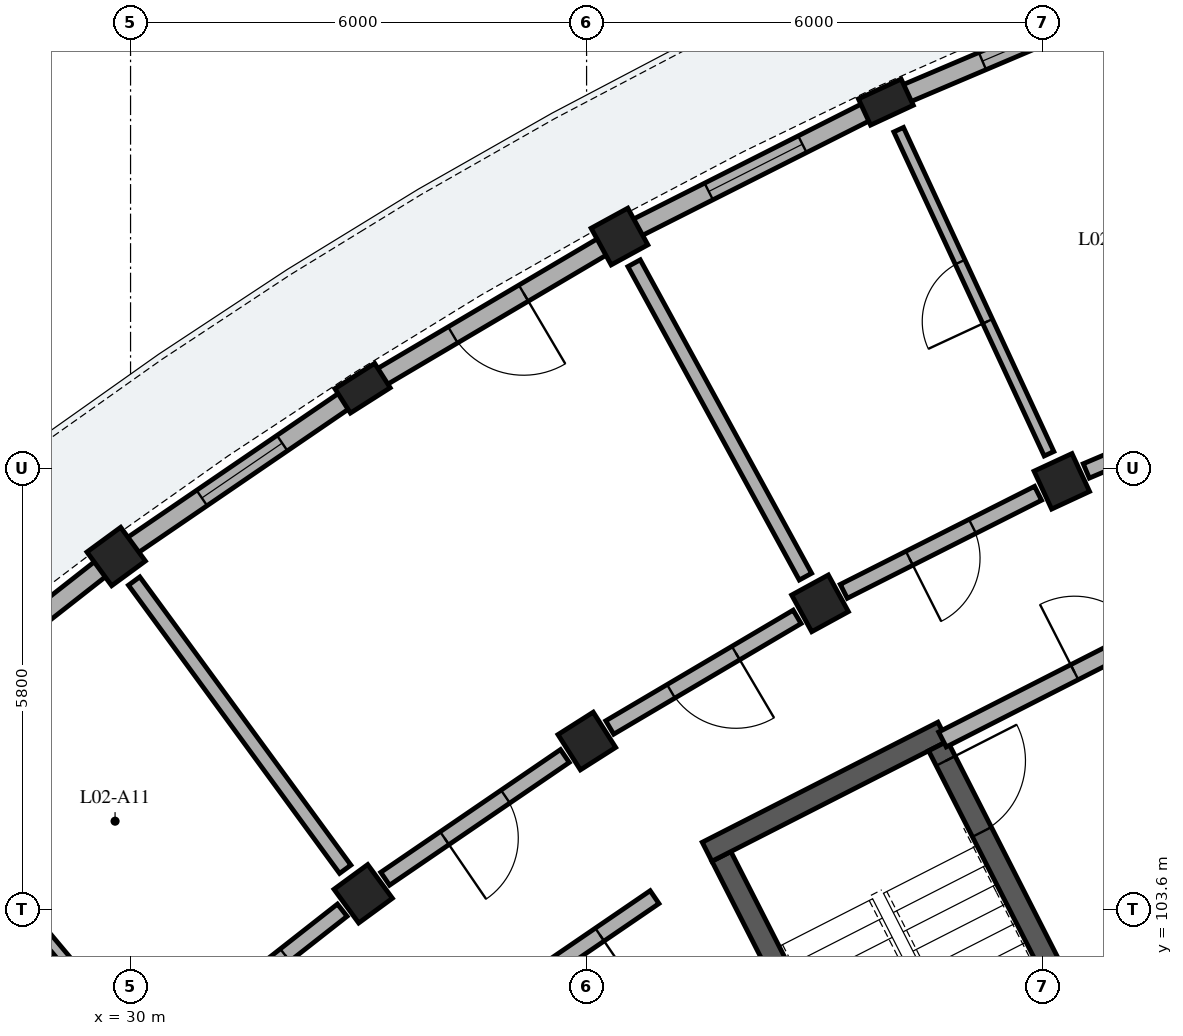
"""IFC4 building model, lengths in metres.
Left out: names, types, materials, properties, quantities, classifications, styles, units other than length and angle.
Written with IfcOpenShell. Run it as: python <this file> out.ifc"""

import sys

from ifc_helpers import new_model, si_unit, direction, frame, frame_2d, origin, origin_2d, place, context, subcontext, project, spatial, rectangle, extrude, element, fill, save


model = new_model("IFC4")
c1 = context("Model", 3, precision=1e-05, world=origin(), true_north=direction((0.0, 1.0)))
c2 = subcontext(c1, "Body", "Model", "MODEL_VIEW")
j1 = project(units=[si_unit("LENGTHUNIT", "METRE"), si_unit("PLANEANGLEUNIT", "RADIAN")], contexts=[c1])
p1 = place(None, origin())
s1 = spatial("IfcSite", under=j1, at=p1, CompositionType="ELEMENT")
p2 = place(p1, origin())
s2 = spatial("IfcBuilding", under=s1, at=p2, CompositionType="ELEMENT")
p3 = place(p2, frame((0.0, 0.0, 8.84)))
s3 = spatial("IfcBuildingStorey", under=s2, at=p3, CompositionType="ELEMENT", Elevation=8.84)
p4 = place(p3, frame((37.773, 104.296, 0.0), z_axis=(0.0, 0.0, 1.0), x_axis=(0.453992276384, -0.891005618941, 0.0)))
e1 = element("IfcWall", 1, at=p4, inside=s3, PredefinedType="SHEAR", context=c2, shape_type="SweptSolid", body=[
    extrude(rectangle(XDim=6.6, YDim=0.28, at=frame_2d((3.3, 0.0))), origin(), (0.0, 0.0, 1.0), 3.11),
])
p5 = place(p3, frame((37.585, 104.357, 0.0), z_axis=(0.0, 0.0, 1.0), x_axis=(0.891020222667, 0.453963613958, 0.0)))
e2 = element("IfcWall", 2, at=p5, inside=s3, PredefinedType="SHEAR", context=c2, shape_type="SweptSolid", body=[
    extrude(rectangle(XDim=3.48, YDim=0.28, at=frame_2d((1.74, 0.0))), origin(), (0.0, 0.0, 1.0), 3.11),
])
p6 = place(p3, frame((40.625, 105.748, 0.0), z_axis=(0.0, 0.0, 1.0), x_axis=(0.453992276384, -0.891005618941, 0.0)))
e3 = element("IfcWall", 3, at=p6, inside=s3, PredefinedType="SHEAR", context=c2, shape_type="SweptSolid", body=[
    extrude(rectangle(XDim=6.6, YDim=0.28, at=frame_2d((3.3, 0.0))), origin(), (0.0, 0.0, 1.0), 3.11),
])
p7 = place(p6, frame((0.22, 0.0, 0.0)))
e4 = element("IfcOpeningElement", 4, at=p7, cuts=e3, PredefinedType="OPENING", context=c2, shape_type="SweptSolid", body=[
    extrude(rectangle(XDim=1.05, YDim=2.15, at=frame_2d((0.525, 1.075))), frame((0.0, 0.15, 0.0), z_axis=(0.0, -1.0, 0.0), x_axis=(1.0, 0.0, 0.0)), (0.0, 0.0, 1.0), 0.3),
])
p8 = place(p3, frame((42.597, 102.561, 0.0), z_axis=(0.0, 0.0, 1.0), x_axis=(0.891001200497, 0.454000947921, 0.0)))
e5 = element("IfcWall", 5, at=p8, inside=s3, PredefinedType="SHEAR", context=c2, shape_type="SweptSolid", body=[
    extrude(rectangle(XDim=3.26, YDim=0.23, at=frame_2d((1.63, 0.0))), origin(), (0.0, 0.0, 1.0), 3.11),
])
p9 = place(p8, frame((0.9, 0.0, 0.0)))
e6 = element("IfcOpeningElement", 6, at=p9, cuts=e5, PredefinedType="OPENING", context=c2, shape_type="SweptSolid", body=[
    extrude(rectangle(XDim=1.1, YDim=2.15, at=frame_2d((0.55, 1.075))), frame((0.0, 0.125, 0.0), z_axis=(0.0, -1.0, 0.0), x_axis=(1.0, 0.0, 0.0)), (0.0, 0.0, 1.0), 0.25),
])
p10 = place(p3, frame((42.252, 109.23, 0.0), z_axis=(0.0, 0.0, 1.0), x_axis=(-0.420859924104, 0.907125638643, 0.0)))
e7 = element("IfcColumn", 7, at=p10, inside=s3, PredefinedType="COLUMN", context=c2, shape_type="SweptSolid", body=[
    extrude(rectangle(XDim=0.55, YDim=0.55, at=origin_2d()), origin(), (0.0, 0.0, 1.0), 3.105),
])
p11 = place(p3, frame((39.938, 114.219, 0.0), z_axis=(0.0, 0.0, 1.0), x_axis=(-0.420859924104, 0.907125638643, 0.0)))
e8 = element("IfcColumn", 8, at=p11, inside=s3, PredefinedType="PILASTER", context=c2, shape_type="SweptSolid", body=[
    extrude(rectangle(XDim=0.38, YDim=0.62, at=origin_2d()), origin(), (0.0, 0.0, 1.0), 3.105),
])
for number, where, z_axis, x_axis in (
    (9, (39.072, 107.625, 0.0), (0.0, 0.0, 1.0), (-0.48, 0.877, 0.0)),
    (10, (36.433, 112.451, 0.0), (0.0, 0.0, 1.0), (-0.48, 0.877, 0.0)),
    (11, (36.003, 105.813, 0.0), (0.0, 0.0, 1.0), (-0.536, 0.844, 0.0)),
):
    element("IfcColumn", number, at=place(p3, frame(where, z_axis=z_axis, x_axis=x_axis)), inside=s3, PredefinedType="COLUMN", context=c2, shape_type="SweptSolid", body=[
        extrude(rectangle(XDim=0.55, YDim=0.55, at=origin_2d()), origin(), (0.0, 0.0, 1.0), 3.105),
    ])
p12 = place(p3, frame((33.052, 110.455, 0.0), z_axis=(0.0, 0.0, 1.0), x_axis=(-0.536481603385, 0.843912015099, 0.0)))
e12 = element("IfcColumn", 12, at=p12, inside=s3, PredefinedType="PILASTER", context=c2, shape_type="SweptSolid", body=[
    extrude(rectangle(XDim=0.38, YDim=0.62, at=origin_2d()), origin(), (0.0, 0.0, 1.0), 3.105),
])
for number, where, z_axis, x_axis in (
    (13, (33.061, 103.804, 0.0), (0.0, 0.0, 1.0), (-0.591, 0.807, 0.0)),
    (14, (29.811, 108.241, 0.0), (0.0, 0.0, 1.0), (-0.591, 0.807, 0.0)),
):
    element("IfcColumn", number, at=place(p3, frame(where, z_axis=z_axis, x_axis=x_axis)), inside=s3, PredefinedType="COLUMN", context=c2, shape_type="SweptSolid", body=[
        extrude(rectangle(XDim=0.55, YDim=0.55, at=origin_2d()), origin(), (0.0, 0.0, 1.0), 3.105),
    ])
p13 = place(p3, frame((43.326, 115.657, 0.0), z_axis=(0.0, 0.0, 1.0), x_axis=(-0.920502438884, -0.390736816807, 0.0)))
e15 = element("IfcWall", 15, at=p13, inside=s3, PredefinedType="SOLIDWALL", context=c2, shape_type="SweptSolid", body=[
    extrude(rectangle(XDim=3.521, YDim=0.245, at=frame_2d((1.76, 0.0))), origin(), (0.0, 0.0, 1.0), 2.355),
])
p14 = place(p13, frame((1.22, 0.0, 0.55)))
e16 = element("IfcOpeningElement", 16, at=p14, cuts=e15, PredefinedType="OPENING", context=c2, shape_type="SweptSolid", body=[
    extrude(rectangle(XDim=1.08, YDim=1.45, at=frame_2d((0.54, 0.725))), frame((0.0, 0.133, 0.0), z_axis=(0.0, -1.0, 0.0), x_axis=(1.0, 0.0, 0.0)), (0.0, 0.0, 1.0), 0.265),
])
p15 = place(p3, frame((39.795, 114.147, 0.0), z_axis=(0.0, 0.0, 1.0), x_axis=(-0.892756700232, -0.450539092855, 0.0)))
e17 = element("IfcWall", 17, at=p15, inside=s3, PredefinedType="SOLIDWALL", context=c2, shape_type="SweptSolid", body=[
    extrude(rectangle(XDim=3.521, YDim=0.245, at=frame_2d((1.76, 0.0))), origin(), (0.0, 0.0, 1.0), 2.355),
])
p16 = place(p15, frame((1.07, 0.0, 0.55)))
e18 = element("IfcOpeningElement", 18, at=p16, cuts=e17, PredefinedType="OPENING", context=c2, shape_type="SweptSolid", body=[
    extrude(rectangle(XDim=1.38, YDim=1.56, at=frame_2d((0.69, 0.78))), frame((0.0, 0.133, 0.0), z_axis=(0.0, -1.0, 0.0), x_axis=(1.0, 0.0, 0.0)), (0.0, 0.0, 1.0), 0.265),
])
p17 = place(p3, frame((36.222, 112.326, 0.0), z_axis=(0.0, 0.0, 1.0), x_axis=(-0.861154218161, -0.50834379365, 0.0)))
e19 = element("IfcWall", 19, at=p17, inside=s3, PredefinedType="SOLIDWALL", context=c2, shape_type="SweptSolid", body=[
    extrude(rectangle(XDim=3.521, YDim=0.245, at=frame_2d((1.76, 0.0))), origin(), (0.0, 0.0, 1.0), 2.355),
])
p18 = place(p17, frame((1.22, 0.0, 0.0)))
e20 = element("IfcOpeningElement", 20, at=p18, cuts=e19, PredefinedType="OPENING", context=c2, shape_type="SweptSolid", body=[
    extrude(rectangle(XDim=1.08, YDim=2.15, at=frame_2d((0.54, 1.075))), frame((0.0, 0.133, 0.0), z_axis=(0.0, -1.0, 0.0), x_axis=(1.0, 0.0, 0.0)), (0.0, 0.0, 1.0), 0.265),
])
p19 = place(p3, frame((32.92, 110.365, 0.0), z_axis=(0.0, 0.0, 1.0), x_axis=(-0.825745840472, -0.56404238045, 0.0)))
e21 = element("IfcWall", 21, at=p19, inside=s3, PredefinedType="SOLIDWALL", context=c2, shape_type="SweptSolid", body=[
    extrude(rectangle(XDim=3.521, YDim=0.245, at=frame_2d((1.76, 0.0))), origin(), (0.0, 0.0, 1.0), 2.355),
])
p20 = place(p19, frame((1.12, 0.0, 0.55)))
e22 = element("IfcOpeningElement", 22, at=p20, cuts=e21, PredefinedType="OPENING", context=c2, shape_type="SweptSolid", body=[
    extrude(rectangle(XDim=1.28, YDim=1.56, at=frame_2d((0.64, 0.78))), frame((0.0, 0.133, 0.0), z_axis=(0.0, -1.0, 0.0), x_axis=(1.0, 0.0, 0.0)), (0.0, 0.0, 1.0), 0.265),
])
p21 = place(p3, frame((29.618, 108.09, 0.0), z_axis=(0.0, 0.0, 1.0), x_axis=(-0.786813798172, -0.617190446301, 0.0)))
e23 = element("IfcWall", 23, at=p21, inside=s3, PredefinedType="SOLIDWALL", context=c2, shape_type="SweptSolid", body=[
    extrude(rectangle(XDim=3.521, YDim=0.245, at=frame_2d((1.76, 0.0))), origin(), (0.0, 0.0, 1.0), 2.355),
])
p22 = place(p21, frame((1.06, 0.0, 0.55)))
e24 = element("IfcOpeningElement", 24, at=p22, cuts=e23, PredefinedType="OPENING", context=c2, shape_type="SweptSolid", body=[
    extrude(rectangle(XDim=1.4, YDim=1.635, at=frame_2d((0.7, 0.817))), frame((0.0, 0.133, 0.0), z_axis=(0.0, -1.0, 0.0), x_axis=(1.0, 0.0, 0.0)), (0.0, 0.0, 1.0), 0.265),
])
p23 = place(p3, frame((40.682, 105.834, 0.0), z_axis=(0.0, 0.0, 1.0), x_axis=(0.891003372311, 0.453996685595, 0.0)))
e25 = element("IfcWall", 25, at=p23, inside=s3, PredefinedType="PARTITIONING", context=c2, shape_type="SweptSolid", body=[
    extrude(rectangle(XDim=4.9, YDim=0.22, at=frame_2d((2.45, 0.0))), origin(), (0.0, 0.0, 1.0), 2.34),
])
p24 = place(p23, frame((1.95, 0.0, 0.0)))
e26 = element("IfcOpeningElement", 26, at=p24, cuts=e25, PredefinedType="OPENING", context=c2, shape_type="SweptSolid", body=[
    extrude(rectangle(XDim=1.0, YDim=2.15, at=frame_2d((0.5, 1.075))), frame((0.0, 0.12, 0.0), z_axis=(0.0, -1.0, 0.0), x_axis=(1.0, 0.0, 0.0)), (0.0, 0.0, 1.0), 0.24),
])
p25 = place(p3, frame((45.21, 110.486, 0.0), z_axis=(0.0, 0.0, 1.0), x_axis=(-0.920511160294, -0.390716270168, 0.0)))
e27 = element("IfcWall", 27, at=p25, inside=s3, PredefinedType="PARTITIONING", context=c2, shape_type="SweptSolid", body=[
    extrude(rectangle(XDim=2.863, YDim=0.205, at=frame_2d((1.432, 0.0))), origin(), (0.0, 0.0, 1.0), 2.37),
])
p26 = place(p25, frame((0.957, 0.0, 0.0)))
e28 = element("IfcOpeningElement", 28, at=p26, cuts=e27, PredefinedType="OPENING", context=c2, shape_type="SweptSolid", body=[
    extrude(rectangle(XDim=0.95, YDim=2.13, at=frame_2d((0.475, 1.065))), frame((0.0, 0.113, 0.0), z_axis=(0.0, -1.0, 0.0), x_axis=(1.0, 0.0, 0.0)), (0.0, 0.0, 1.0), 0.225),
])
p27 = place(p3, frame((42.084, 109.593, 0.0), z_axis=(0.0, 0.0, 1.0), x_axis=(-0.420862519045, 0.907124434718, 0.0)))
e29 = element("IfcWall", 29, at=p27, inside=s3, PredefinedType="PLUMBINGWALL", context=c2, shape_type="SweptSolid", body=[
    extrude(rectangle(XDim=4.7, YDim=0.14, at=frame_2d((2.35, 0.0))), origin(), (0.0, 0.0, 1.0), 2.37),
])
p28 = place(p27, frame((1.92, 0.0, 0.0)))
e30 = element("IfcOpeningElement", 30, at=p28, cuts=e29, PredefinedType="OPENING", context=c2, shape_type="SweptSolid", body=[
    extrude(rectangle(XDim=0.86, YDim=2.06, at=frame_2d((0.43, 1.03))), frame((0.0, 0.08, 0.0), z_axis=(0.0, -1.0, 0.0), x_axis=(1.0, 0.0, 0.0)), (0.0, 0.0, 1.0), 0.16),
])
p29 = place(p3, frame((41.94, 109.073, 0.0), z_axis=(0.0, 0.0, 1.0), x_axis=(-0.89273239336, -0.450587254419, 0.0)))
e31 = element("IfcWall", 31, at=p29, inside=s3, PredefinedType="PARTITIONING", context=c2, shape_type="SweptSolid", body=[
    extrude(rectangle(XDim=2.863, YDim=0.205, at=frame_2d((1.432, 0.0))), origin(), (0.0, 0.0, 1.0), 2.37),
])
p30 = place(p29, frame((0.967, 0.0, 0.0)))
e32 = element("IfcOpeningElement", 32, at=p30, cuts=e31, PredefinedType="OPENING", context=c2, shape_type="SweptSolid", body=[
    extrude(rectangle(XDim=0.93, YDim=2.12, at=frame_2d((0.465, 1.06))), frame((0.0, 0.113, 0.0), z_axis=(0.0, -1.0, 0.0), x_axis=(1.0, 0.0, 0.0)), (0.0, 0.0, 1.0), 0.225),
])
p31 = place(p3, frame((38.88, 107.976, 0.0), z_axis=(0.0, 0.0, 1.0), x_axis=(-0.479721743761, 0.877420679357, 0.0)))
e33 = element("IfcWall", 33, at=p31, inside=s3, PredefinedType="PARTITIONING", context=c2, shape_type="SweptSolid", body=[
    extrude(rectangle(XDim=4.7, YDim=0.185, at=frame_2d((2.35, 0.0))), origin(), (0.0, 0.0, 1.0), 2.37),
])
p32 = place(p3, frame((38.77, 107.447, 0.0), z_axis=(0.0, 0.0, 1.0), x_axis=(-0.861113214678, -0.508413248753, 0.0)))
e34 = element("IfcWall", 34, at=p32, inside=s3, PredefinedType="PARTITIONING", context=c2, shape_type="SweptSolid", body=[
    extrude(rectangle(XDim=2.863, YDim=0.205, at=frame_2d((1.432, 0.0))), origin(), (0.0, 0.0, 1.0), 2.37),
])
p33 = place(p32, frame((0.937, 0.0, 0.0)))
e35 = element("IfcOpeningElement", 35, at=p33, cuts=e34, PredefinedType="OPENING", context=c2, shape_type="SweptSolid", body=[
    extrude(rectangle(XDim=0.99, YDim=2.16, at=frame_2d((0.495, 1.08))), frame((0.0, 0.113, 0.0), z_axis=(0.0, -1.0, 0.0), x_axis=(1.0, 0.0, 0.0)), (0.0, 0.0, 1.0), 0.225),
])
p34 = place(p3, frame((35.714, 105.616, 0.0), z_axis=(0.0, 0.0, 1.0), x_axis=(-0.825779671787, -0.563992848947, 0.0)))
e36 = element("IfcWall", 36, at=p34, inside=s3, PredefinedType="PARTITIONING", context=c2, shape_type="SweptSolid", body=[
    extrude(rectangle(XDim=2.863, YDim=0.205, at=frame_2d((1.432, 0.0))), origin(), (0.0, 0.0, 1.0), 2.37),
])
p35 = place(p34, frame((0.947, 0.0, 0.0)))
e37 = element("IfcOpeningElement", 37, at=p35, cuts=e36, PredefinedType="OPENING", context=c2, shape_type="SweptSolid", body=[
    extrude(rectangle(XDim=0.97, YDim=2.15, at=frame_2d((0.485, 1.075))), frame((0.0, 0.113, 0.0), z_axis=(0.0, -1.0, 0.0), x_axis=(1.0, 0.0, 0.0)), (0.0, 0.0, 1.0), 0.225),
])
p36 = place(p3, frame((36.895, 103.76, 0.0), z_axis=(0.0, 0.0, 1.0), x_axis=(-0.825752009056, -0.56403334967, 0.0)))
e38 = element("IfcWall", 38, at=p36, inside=s3, PredefinedType="PARTITIONING", context=c2, shape_type="SweptSolid", body=[
    extrude(rectangle(XDim=2.718, YDim=0.205, at=frame_2d((1.359, 0.0))), origin(), (0.0, 0.0, 1.0), 2.37),
])
p37 = place(p36, frame((0.874, 0.0, 0.0)))
e39 = element("IfcOpeningElement", 39, at=p37, cuts=e38, PredefinedType="OPENING", context=c2, shape_type="SweptSolid", body=[
    extrude(rectangle(XDim=0.97, YDim=2.15, at=frame_2d((0.485, 1.075))), frame((0.0, 0.113, 0.0), z_axis=(0.0, -1.0, 0.0), x_axis=(1.0, 0.0, 0.0)), (0.0, 0.0, 1.0), 0.225),
])
p38 = place(p3, frame((32.824, 104.126, 0.0), z_axis=(0.0, 0.0, 1.0), x_axis=(-0.590910940129, 0.806736797745, 0.0)))
e40 = element("IfcWall", 40, at=p38, inside=s3, PredefinedType="PARTITIONING", context=c2, shape_type="SweptSolid", body=[
    extrude(rectangle(XDim=4.7, YDim=0.185, at=frame_2d((2.35, 0.0))), origin(), (0.0, 0.0, 1.0), 2.37),
])
p39 = place(p3, frame((32.785, 103.588, 0.0), z_axis=(0.0, 0.0, 1.0), x_axis=(-0.786806323554, -0.617199975061, 0.0)))
e41 = element("IfcWall", 41, at=p39, inside=s3, PredefinedType="PARTITIONING", context=c2, shape_type="SweptSolid", body=[
    extrude(rectangle(XDim=2.863, YDim=0.205, at=frame_2d((1.432, 0.0))), origin(), (0.0, 0.0, 1.0), 2.37),
])
p40 = place(p39, frame((0.957, 0.0, 0.0)))
e42 = element("IfcOpeningElement", 42, at=p40, cuts=e41, PredefinedType="OPENING", context=c2, shape_type="SweptSolid", body=[
    extrude(rectangle(XDim=0.95, YDim=2.13, at=frame_2d((0.475, 1.065))), frame((0.0, 0.113, 0.0), z_axis=(0.0, -1.0, 0.0), x_axis=(1.0, 0.0, 0.0)), (0.0, 0.0, 1.0), 0.225),
])
p41 = place(p3, frame((30.0, 101.911, 0.0), z_axis=(0.0, 0.0, 1.0), x_axis=(-0.642811926223, 0.766024038465, 0.0)))
e43 = element("IfcWall", 43, at=p41, inside=s3, PredefinedType="PLUMBINGWALL", context=c2, shape_type="SweptSolid", body=[
    extrude(rectangle(XDim=4.7, YDim=0.14, at=frame_2d((2.35, 0.0))), origin(), (0.0, 0.0, 1.0), 2.37),
])
p42 = place(p41, frame((1.92, 0.0, 0.0)))
e44 = element("IfcOpeningElement", 44, at=p42, cuts=e43, PredefinedType="OPENING", context=c2, shape_type="SweptSolid", body=[
    extrude(rectangle(XDim=0.86, YDim=2.06, at=frame_2d((0.43, 1.03))), frame((0.0, 0.08, 0.0), z_axis=(0.0, -1.0, 0.0), x_axis=(1.0, 0.0, 0.0)), (0.0, 0.0, 1.0), 0.16),
])
p43 = place(p14, origin())
e45 = element("IfcWindow", 45, at=p43, inside=s3, PartitioningType="SINGLE_PANEL", PredefinedType="WINDOW", context=c2, shape_type="SweptSolid", body=[
    extrude(rectangle(XDim=1.08, YDim=1.45, at=frame_2d((0.54, 0.725))), frame((0.0, 0.03, 0.0), z_axis=(0.0, -1.0, 0.0), x_axis=(1.0, 0.0, 0.0)), (0.0, 0.0, 1.0), 0.06),
])
fill(e16, e45)
p44 = place(p16, origin())
e46 = element("IfcWindow", 46, at=p44, inside=s3, PartitioningType="SINGLE_PANEL", PredefinedType="WINDOW", context=c2, shape_type="SweptSolid", body=[
    extrude(rectangle(XDim=1.38, YDim=1.56, at=frame_2d((0.69, 0.78))), frame((0.0, 0.03, 0.0), z_axis=(0.0, -1.0, 0.0), x_axis=(1.0, 0.0, 0.0)), (0.0, 0.0, 1.0), 0.06),
])
fill(e18, e46)
p45 = place(p18, origin())
e47 = element("IfcDoor", 47, at=p45, inside=s3, OperationType="SINGLE_SWING_LEFT", PredefinedType="DOOR", context=c2, shape_type="SweptSolid", body=[
    extrude(rectangle(XDim=1.08, YDim=2.15, at=frame_2d((0.54, 1.075))), frame((0.0, 0.025, 0.0), z_axis=(0.0, -1.0, 0.0), x_axis=(1.0, 0.0, 0.0)), (0.0, 0.0, 1.0), 0.05),
])
fill(e20, e47)
p46 = place(p20, origin())
e48 = element("IfcWindow", 48, at=p46, inside=s3, PartitioningType="SINGLE_PANEL", PredefinedType="WINDOW", context=c2, shape_type="SweptSolid", body=[
    extrude(rectangle(XDim=1.28, YDim=1.56, at=frame_2d((0.64, 0.78))), frame((0.0, 0.03, 0.0), z_axis=(0.0, -1.0, 0.0), x_axis=(1.0, 0.0, 0.0)), (0.0, 0.0, 1.0), 0.06),
])
fill(e22, e48)
p47 = place(p7, origin())
e49 = element("IfcDoor", 49, at=p47, inside=s3, OperationType="SINGLE_SWING_LEFT", PredefinedType="DOOR", context=c2, shape_type="SweptSolid", body=[
    extrude(rectangle(XDim=1.05, YDim=2.15, at=frame_2d((0.525, 1.075))), frame((0.0, 0.025, 0.0), z_axis=(0.0, -1.0, 0.0), x_axis=(1.0, 0.0, 0.0)), (0.0, 0.0, 1.0), 0.05),
])
fill(e4, e49)
p48 = place(p24, origin())
e50 = element("IfcDoor", 50, at=p48, inside=s3, OperationType="SINGLE_SWING_LEFT", PredefinedType="DOOR", context=c2, shape_type="SweptSolid", body=[
    extrude(rectangle(XDim=1.0, YDim=2.15, at=frame_2d((0.5, 1.075))), frame((0.0, 0.025, 0.0), z_axis=(0.0, -1.0, 0.0), x_axis=(1.0, 0.0, 0.0)), (0.0, 0.0, 1.0), 0.05),
])
fill(e26, e50)
p49 = place(p28, origin())
e51 = element("IfcDoor", 51, at=p49, inside=s3, OperationType="SINGLE_SWING_LEFT", PredefinedType="DOOR", context=c2, shape_type="SweptSolid", body=[
    extrude(rectangle(XDim=0.86, YDim=2.06, at=frame_2d((0.43, 1.03))), frame((0.0, 0.025, 0.0), z_axis=(0.0, -1.0, 0.0), x_axis=(1.0, 0.0, 0.0)), (0.0, 0.0, 1.0), 0.05),
])
fill(e30, e51)
p50 = place(p30, origin())
e52 = element("IfcDoor", 52, at=p50, inside=s3, OperationType="SINGLE_SWING_RIGHT", PredefinedType="DOOR", context=c2, shape_type="SweptSolid", body=[
    extrude(rectangle(XDim=0.93, YDim=2.12, at=frame_2d((0.465, 1.06))), frame((0.0, 0.025, 0.0), z_axis=(0.0, -1.0, 0.0), x_axis=(1.0, 0.0, 0.0)), (0.0, 0.0, 1.0), 0.05),
])
fill(e32, e52)
p51 = place(p33, origin())
e53 = element("IfcDoor", 53, at=p51, inside=s3, OperationType="SINGLE_SWING_LEFT", PredefinedType="DOOR", context=c2, shape_type="SweptSolid", body=[
    extrude(rectangle(XDim=0.99, YDim=2.16, at=frame_2d((0.495, 1.08))), frame((0.0, 0.025, 0.0), z_axis=(0.0, -1.0, 0.0), x_axis=(1.0, 0.0, 0.0)), (0.0, 0.0, 1.0), 0.05),
])
fill(e35, e53)
p52 = place(p35, origin())
e54 = element("IfcDoor", 54, at=p52, inside=s3, OperationType="SINGLE_SWING_RIGHT", PredefinedType="DOOR", context=c2, shape_type="SweptSolid", body=[
    extrude(rectangle(XDim=0.97, YDim=2.15, at=frame_2d((0.485, 1.075))), frame((0.0, 0.025, 0.0), z_axis=(0.0, -1.0, 0.0), x_axis=(1.0, 0.0, 0.0)), (0.0, 0.0, 1.0), 0.05),
])
fill(e37, e54)
p53 = place(p37, origin())
e55 = element("IfcDoor", 55, at=p53, inside=s3, OperationType="SINGLE_SWING_LEFT", PredefinedType="DOOR", context=c2, shape_type="SweptSolid", body=[
    extrude(rectangle(XDim=0.97, YDim=2.15, at=frame_2d((0.485, 1.075))), frame((0.0, 0.025, 0.0), z_axis=(0.0, -1.0, 0.0), x_axis=(1.0, 0.0, 0.0)), (0.0, 0.0, 1.0), 0.05),
])
fill(e39, e55)
p54 = place(p40, origin())
e56 = element("IfcDoor", 56, at=p54, inside=s3, OperationType="SINGLE_SWING_LEFT", PredefinedType="DOOR", context=c2, shape_type="SweptSolid", body=[
    extrude(rectangle(XDim=0.95, YDim=2.13, at=frame_2d((0.475, 1.065))), frame((0.0, 0.025, 0.0), z_axis=(0.0, -1.0, 0.0), x_axis=(1.0, 0.0, 0.0)), (0.0, 0.0, 1.0), 0.05),
])
fill(e42, e56)
save(model, sys.argv[1])
